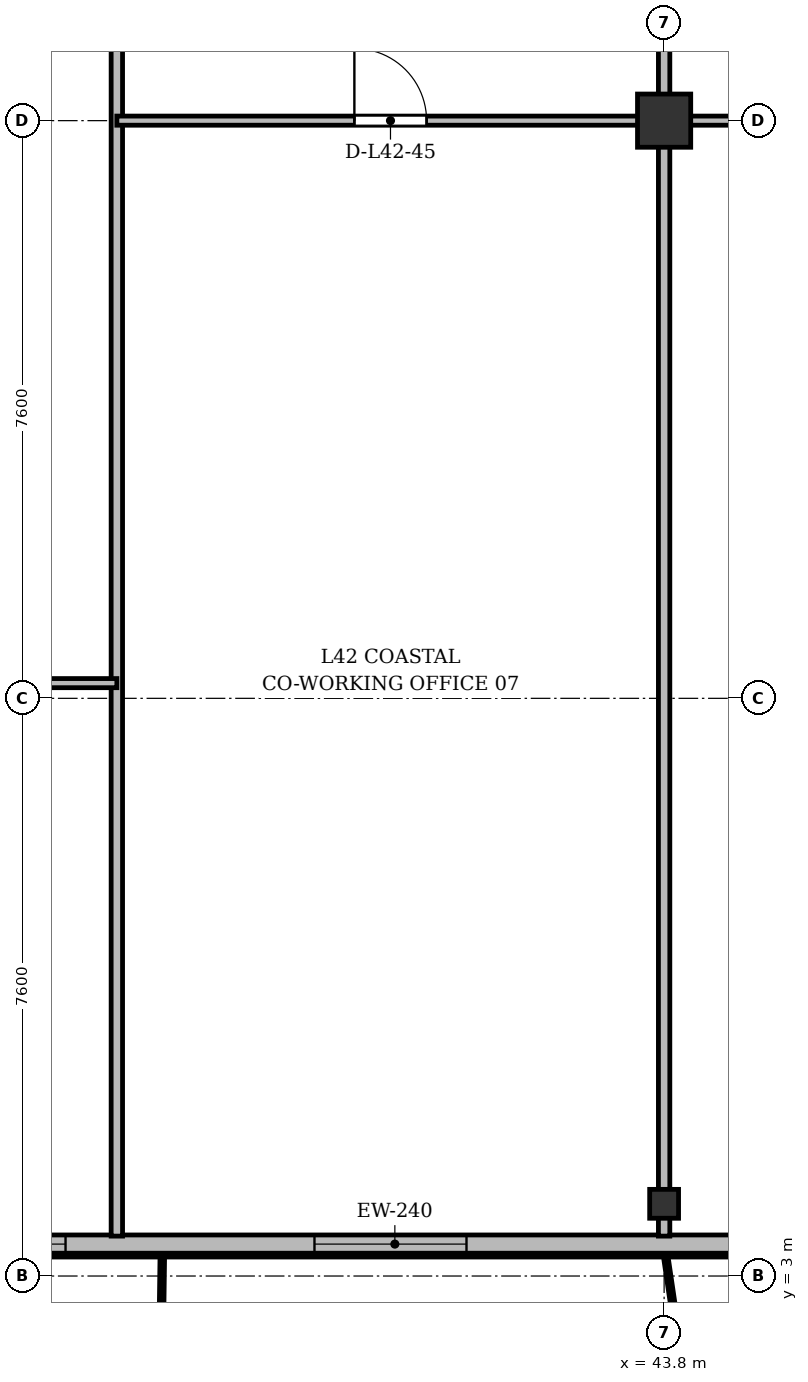
"""IFC4 building model, lengths in metres.
Left out: names, types, materials, properties, quantities, classifications, styles, units other than length and angle.
Written with IfcOpenShell. Run it as: python <this file> out.ifc"""

import sys

from ifc_helpers import new_model, si_unit, direction, frame, frame_2d, origin, origin_2d, place, context, subcontext, project, spatial, rectangle, i_section, extrude, source, transform, mapped, element, fill, save


model = new_model("IFC4")
c1 = context("Model", 3, precision=1e-05, world=origin(), true_north=direction((0.0, 1.0)))
c2 = subcontext(c1, "Body", "Model", "MODEL_VIEW")
j1 = project(units=[si_unit("LENGTHUNIT", "METRE"), si_unit("PLANEANGLEUNIT", "RADIAN")], contexts=[c1])
p1 = place(None, origin())
s1 = spatial("IfcSite", under=j1, at=p1, CompositionType="ELEMENT")
p2 = place(p1, origin())
s2 = spatial("IfcBuilding", under=s1, at=p2, CompositionType="ELEMENT")
p3 = place(p2, frame((0.0, 0.0, 160.9)))
s3 = spatial("IfcBuildingStorey", under=s2, at=p3, CompositionType="ELEMENT", Elevation=160.9)
m1 = source(origin(), c2, "Body", "SweptSolid", [
    extrude(i_section(OverallWidth=0.38, OverallDepth=0.38, WebThickness=0.02, FlangeThickness=0.03, at=origin_2d()), origin(), (0.0, 0.0, 1.0), 3.6),
])
p4 = place(p3, frame((43.8, 3.95, 0.0), z_axis=(0.0, 0.0, 1.0), x_axis=(1.0, 0.0, 0.0)))
e1 = element("IfcColumn", 1, at=p4, inside=s3, PredefinedType="COLUMN", context=c2, shape_type="MappedRepresentation", body=[
    mapped(m1, transform((0.0, 0.0, 0.0), x_axis=(1.0, 0.0, 0.0), y_axis=(0.0, 1.0, 0.0), z_axis=(0.0, 0.0, 1.0), scale=1.0)),
])
m2 = source(origin(), c2, "Body", "SweptSolid", [
    extrude(rectangle(XDim=0.7, YDim=0.7, at=origin_2d()), origin(), (0.0, 0.0, 1.0), 3.6),
])
p5 = place(p3, frame((43.8, 18.2, 0.0), z_axis=(0.0, 0.0, 1.0), x_axis=(1.0, 0.0, 0.0)))
e2 = element("IfcColumn", 2, at=p5, inside=s3, PredefinedType="COLUMN", context=c2, shape_type="MappedRepresentation", body=[
    mapped(m2, transform((0.0, 0.0, 0.0), x_axis=(1.0, 0.0, 0.0), y_axis=(0.0, 1.0, 0.0), z_axis=(0.0, 0.0, 1.0), scale=1.0)),
])
p6 = place(p3, frame((63.6, 3.42, 0.0), z_axis=(0.0, 0.0, 1.0), x_axis=(-1.0, 0.0, 0.0)))
e3 = element("IfcWall", 3, at=p6, inside=s3, PredefinedType="SOLIDWALL", context=c2, shape_type="SweptSolid", body=[
    extrude(rectangle(XDim=52.8, YDim=0.24, at=frame_2d((26.4, 0.0))), origin(), (0.0, 0.0, 1.0), 3.35),
])
p7 = place(p6, frame((0.295, 0.0, 0.9)))
e4 = element("IfcOpeningElement", 4, at=p7, cuts=e3, PredefinedType="OPENING", context=c2, shape_type="SweptSolid", body=[
    extrude(rectangle(XDim=1.5, YDim=1.75, at=frame_2d((0.75, 0.875))), frame((0.0, 0.13, 0.0), z_axis=(0.0, -1.0, 0.0), x_axis=(1.0, 0.0, 0.0)), (0.0, 0.0, 1.0), 0.26),
])
p8 = place(p6, frame((3.7, 0.0, 0.9)))
e5 = element("IfcOpeningElement", 5, at=p8, cuts=e3, PredefinedType="OPENING", context=c2, shape_type="SweptSolid", body=[
    extrude(rectangle(XDim=2.0, YDim=1.95, at=frame_2d((1.0, 0.975))), frame((0.0, 0.13, 0.0), z_axis=(0.0, -1.0, 0.0), x_axis=(1.0, 0.0, 0.0)), (0.0, 0.0, 1.0), 0.26),
])
p9 = place(p6, frame((7.635, 0.0, 0.0)))
e6 = element("IfcOpeningElement", 6, at=p9, cuts=e3, PredefinedType="OPENING", context=c2, shape_type="SweptSolid", body=[
    extrude(rectangle(XDim=1.2, YDim=2.2, at=frame_2d((0.6, 1.1))), frame((0.0, 0.13, 0.0), z_axis=(0.0, -1.0, 0.0), x_axis=(1.0, 0.0, 0.0)), (0.0, 0.0, 1.0), 0.26),
])
p10 = place(p6, frame((9.7, 0.0, 0.9)))
e7 = element("IfcOpeningElement", 7, at=p10, cuts=e3, PredefinedType="OPENING", context=c2, shape_type="SweptSolid", body=[
    extrude(rectangle(XDim=1.8, YDim=1.8, at=frame_2d((0.9, 0.9))), frame((0.0, 0.13, 0.0), z_axis=(0.0, -1.0, 0.0), x_axis=(1.0, 0.0, 0.0)), (0.0, 0.0, 1.0), 0.26),
])
p11 = place(p6, frame((12.25, 0.0, 0.9)))
e8 = element("IfcOpeningElement", 8, at=p11, cuts=e3, PredefinedType="OPENING", context=c2, shape_type="SweptSolid", body=[
    extrude(rectangle(XDim=1.5, YDim=1.75, at=frame_2d((0.75, 0.875))), frame((0.0, 0.13, 0.0), z_axis=(0.0, -1.0, 0.0), x_axis=(1.0, 0.0, 0.0)), (0.0, 0.0, 1.0), 0.26),
])
p12 = place(p6, frame((16.25, 0.0, 0.9)))
e9 = element("IfcOpeningElement", 9, at=p12, cuts=e3, PredefinedType="OPENING", context=c2, shape_type="SweptSolid", body=[
    extrude(rectangle(XDim=1.5, YDim=1.75, at=frame_2d((0.75, 0.875))), frame((0.0, 0.13, 0.0), z_axis=(0.0, -1.0, 0.0), x_axis=(1.0, 0.0, 0.0)), (0.0, 0.0, 1.0), 0.26),
])
p13 = place(p6, frame((22.4, 0.0, 0.9)))
e10 = element("IfcOpeningElement", 10, at=p13, cuts=e3, PredefinedType="OPENING", context=c2, shape_type="SweptSolid", body=[
    extrude(rectangle(XDim=2.0, YDim=1.95, at=frame_2d((1.0, 0.975))), frame((0.0, 0.13, 0.0), z_axis=(0.0, -1.0, 0.0), x_axis=(1.0, 0.0, 0.0)), (0.0, 0.0, 1.0), 0.26),
])
p14 = place(p6, frame((27.675, 0.0, 0.9)))
e11 = element("IfcOpeningElement", 11, at=p14, cuts=e3, PredefinedType="OPENING", context=c2, shape_type="SweptSolid", body=[
    extrude(rectangle(XDim=1.65, YDim=1.85, at=frame_2d((0.825, 0.925))), frame((0.0, 0.13, 0.0), z_axis=(0.0, -1.0, 0.0), x_axis=(1.0, 0.0, 0.0)), (0.0, 0.0, 1.0), 0.26),
])
p15 = place(p6, frame((30.6, 0.0, 0.9)))
e12 = element("IfcOpeningElement", 12, at=p15, cuts=e3, PredefinedType="OPENING", context=c2, shape_type="SweptSolid", body=[
    extrude(rectangle(XDim=1.8, YDim=1.8, at=frame_2d((0.9, 0.9))), frame((0.0, 0.13, 0.0), z_axis=(0.0, -1.0, 0.0), x_axis=(1.0, 0.0, 0.0)), (0.0, 0.0, 1.0), 0.26),
])
p16 = place(p6, frame((34.1, 0.0, 0.9)))
e13 = element("IfcOpeningElement", 13, at=p16, cuts=e3, PredefinedType="OPENING", context=c2, shape_type="SweptSolid", body=[
    extrude(rectangle(XDim=2.2, YDim=1.8, at=frame_2d((1.1, 0.9))), frame((0.0, 0.13, 0.0), z_axis=(0.0, -1.0, 0.0), x_axis=(1.0, 0.0, 0.0)), (0.0, 0.0, 1.0), 0.26),
])
p17 = place(p6, frame((39.65, 0.0, 0.9)))
e14 = element("IfcOpeningElement", 14, at=p17, cuts=e3, PredefinedType="OPENING", context=c2, shape_type="SweptSolid", body=[
    extrude(rectangle(XDim=1.5, YDim=1.75, at=frame_2d((0.75, 0.875))), frame((0.0, 0.13, 0.0), z_axis=(0.0, -1.0, 0.0), x_axis=(1.0, 0.0, 0.0)), (0.0, 0.0, 1.0), 0.26),
])
p18 = place(p6, frame((43.65, 0.0, 0.9)))
e15 = element("IfcOpeningElement", 15, at=p18, cuts=e3, PredefinedType="OPENING", context=c2, shape_type="SweptSolid", body=[
    extrude(rectangle(XDim=1.5, YDim=1.75, at=frame_2d((0.75, 0.875))), frame((0.0, 0.13, 0.0), z_axis=(0.0, -1.0, 0.0), x_axis=(1.0, 0.0, 0.0)), (0.0, 0.0, 1.0), 0.26),
])
p19 = place(p6, frame((47.275, 0.0, 0.9)))
e16 = element("IfcOpeningElement", 16, at=p19, cuts=e3, PredefinedType="OPENING", context=c2, shape_type="SweptSolid", body=[
    extrude(rectangle(XDim=1.65, YDim=1.85, at=frame_2d((0.825, 0.925))), frame((0.0, 0.13, 0.0), z_axis=(0.0, -1.0, 0.0), x_axis=(1.0, 0.0, 0.0)), (0.0, 0.0, 1.0), 0.26),
])
p20 = place(p6, frame((51.005, 0.0, 0.9)))
e17 = element("IfcOpeningElement", 17, at=p20, cuts=e3, PredefinedType="OPENING", context=c2, shape_type="SweptSolid", body=[
    extrude(rectangle(XDim=1.5, YDim=1.75, at=frame_2d((0.75, 0.875))), frame((0.0, 0.13, 0.0), z_axis=(0.0, -1.0, 0.0), x_axis=(1.0, 0.0, 0.0)), (0.0, 0.0, 1.0), 0.26),
])
p21 = place(p6, frame((37.85, 0.0, 0.0)))
e18 = element("IfcOpeningElement", 18, at=p21, cuts=e3, PredefinedType="OPENING", context=c2, shape_type="SweptSolid", body=[
    extrude(rectangle(XDim=1.2, YDim=2.2, at=frame_2d((0.6, 1.1))), frame((0.0, 0.13, 0.0), z_axis=(0.0, -1.0, 0.0), x_axis=(1.0, 0.0, 0.0)), (0.0, 0.0, 1.0), 0.26),
])
p22 = place(p3, frame((36.6, 3.525, 0.0), z_axis=(0.0, 0.0, 1.0), x_axis=(0.0, 1.0, 0.0)))
e19 = element("IfcWall", 19, at=p22, inside=s3, PredefinedType="PARTITIONING", context=c2, shape_type="SweptSolid", body=[
    extrude(rectangle(XDim=27.275, YDim=0.15, at=frame_2d((13.638, 0.0))), origin(), (0.0, 0.0, 1.0), 2.75),
])
p23 = place(p3, frame((43.8, 3.525, 0.0), z_axis=(0.0, 0.0, 1.0), x_axis=(0.0, 1.0, 0.0)))
e20 = element("IfcWall", 20, at=p23, inside=s3, PredefinedType="PARTITIONING", context=c2, shape_type="SweptSolid", body=[
    extrude(rectangle(XDim=27.275, YDim=0.15, at=frame_2d((13.638, 0.0))), origin(), (0.0, 0.0, 1.0), 2.85),
])
p24 = place(p3, frame((33.6, 10.8, 0.0), z_axis=(0.0, 0.0, 1.0), x_axis=(1.0, 0.0, 0.0)))
e21 = element("IfcWall", 21, at=p24, inside=s3, PredefinedType="PARTITIONING", context=c2, shape_type="SweptSolid", body=[
    extrude(rectangle(XDim=3.0, YDim=0.12, at=frame_2d((1.5, 0.0))), origin(), (0.0, 0.0, 1.0), 3.35),
])
p25 = place(p24, frame((1.025, 0.0, 0.0)))
e22 = element("IfcOpeningElement", 22, at=p25, cuts=e21, PredefinedType="OPENING", context=c2, shape_type="SweptSolid", body=[
    extrude(rectangle(XDim=0.95, YDim=2.15, at=frame_2d((0.475, 1.075))), frame((0.0, 0.07, 0.0), z_axis=(0.0, -1.0, 0.0), x_axis=(1.0, 0.0, 0.0)), (0.0, 0.0, 1.0), 0.14),
])
p26 = place(p3, frame((36.6, 18.2, 0.0), z_axis=(0.0, 0.0, 1.0), x_axis=(1.0, 0.0, 0.0)))
e23 = element("IfcWall", 23, at=p26, inside=s3, PredefinedType="PARTITIONING", context=c2, shape_type="SweptSolid", body=[
    extrude(rectangle(XDim=7.2, YDim=0.12, at=frame_2d((3.6, 0.0))), origin(), (0.0, 0.0, 1.0), 2.75),
])
p27 = place(p26, frame((3.125, 0.0, 0.0)))
e24 = element("IfcOpeningElement", 24, at=p27, cuts=e23, PredefinedType="OPENING", context=c2, shape_type="SweptSolid", body=[
    extrude(rectangle(XDim=0.95, YDim=2.15, at=frame_2d((0.475, 1.075))), frame((0.0, 0.07, 0.0), z_axis=(0.0, -1.0, 0.0), x_axis=(1.0, 0.0, 0.0)), (0.0, 0.0, 1.0), 0.14),
])
p28 = place(p3, frame((43.8, 18.2, 0.0), z_axis=(0.0, 0.0, 1.0), x_axis=(1.0, 0.0, 0.0)))
e25 = element("IfcWall", 25, at=p28, inside=s3, PredefinedType="PARTITIONING", context=c2, shape_type="SweptSolid", body=[
    extrude(rectangle(XDim=5.6, YDim=0.12, at=frame_2d((2.8, 0.0))), origin(), (0.0, 0.0, 1.0), 2.75),
])
p29 = place(p28, frame((2.418, 0.0, 0.0)))
e26 = element("IfcOpeningElement", 26, at=p29, cuts=e25, PredefinedType="OPENING", context=c2, shape_type="SweptSolid", body=[
    extrude(rectangle(XDim=0.95, YDim=2.15, at=frame_2d((0.475, 1.075))), frame((0.0, 0.07, 0.0), z_axis=(0.0, -1.0, 0.0), x_axis=(1.0, 0.0, 0.0)), (0.0, 0.0, 1.0), 0.14),
])
m3 = source(origin(), c2, "Body", "SweptSolid", [
    extrude(rectangle(XDim=2.0, YDim=1.95, at=frame_2d((1.0, 0.975))), frame((0.0, 0.03, 0.0), z_axis=(0.0, -1.0, 0.0), x_axis=(1.0, 0.0, 0.0)), (0.0, 0.0, 1.0), 0.06),
])
p30 = place(p13, origin())
e27 = element("IfcWindow", 27, at=p30, inside=s3, PartitioningType="SINGLE_PANEL", PredefinedType="WINDOW", context=c2, shape_type="MappedRepresentation", body=[
    mapped(m3, transform((0.0, 0.0, 0.0), x_axis=(1.0, 0.0, 0.0), y_axis=(0.0, 1.0, 0.0), z_axis=(0.0, 0.0, 1.0), scale=1.0)),
])
fill(e10, e27)
m4 = source(origin(), c2, "Body", "SweptSolid", [
    extrude(rectangle(XDim=1.65, YDim=1.85, at=frame_2d((0.825, 0.925))), frame((0.0, 0.03, 0.0), z_axis=(0.0, -1.0, 0.0), x_axis=(1.0, 0.0, 0.0)), (0.0, 0.0, 1.0), 0.06),
])
p31 = place(p14, origin())
e28 = element("IfcWindow", 28, at=p31, inside=s3, PartitioningType="SINGLE_PANEL", PredefinedType="WINDOW", context=c2, shape_type="MappedRepresentation", body=[
    mapped(m4, transform((0.0, 0.0, 0.0), x_axis=(1.0, 0.0, 0.0), y_axis=(0.0, 1.0, 0.0), z_axis=(0.0, 0.0, 1.0), scale=1.0)),
])
fill(e11, e28)
m5 = source(origin(), c2, "Body", "SweptSolid", [
    extrude(rectangle(XDim=0.95, YDim=2.15, at=frame_2d((0.475, 1.075))), frame((0.0, 0.025, 0.0), z_axis=(0.0, -1.0, 0.0), x_axis=(1.0, 0.0, 0.0)), (0.0, 0.0, 1.0), 0.05),
])
p32 = place(p27, origin())
e29 = element("IfcDoor", 29, at=p32, inside=s3, OperationType="SINGLE_SWING_LEFT", PredefinedType="DOOR", context=c2, shape_type="MappedRepresentation", body=[
    mapped(m5, transform((0.0, 0.0, 0.0), x_axis=(1.0, 0.0, 0.0), y_axis=(0.0, 1.0, 0.0), z_axis=(0.0, 0.0, 1.0), scale=1.0)),
])
fill(e24, e29)
save(model, sys.argv[1])
